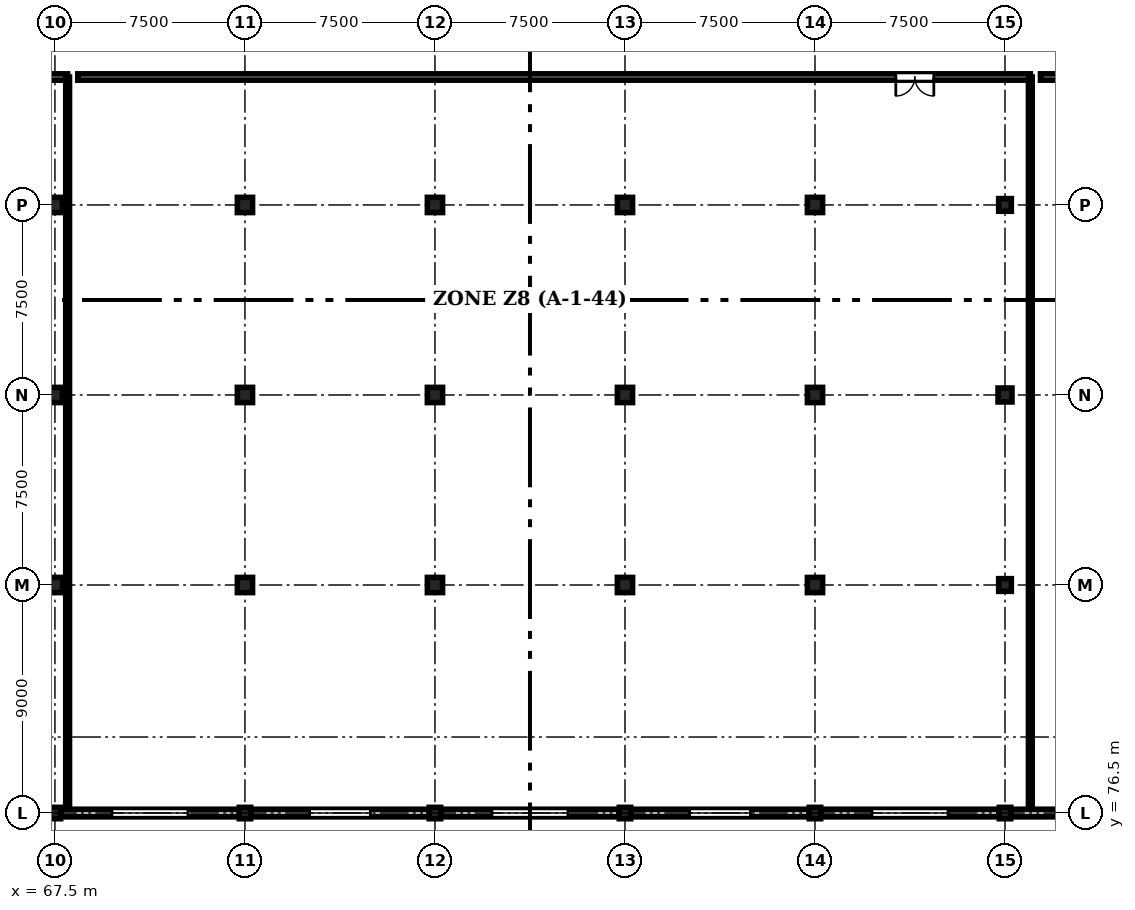
"""IFC4 building model, lengths in metres.
Left out: names, types, materials, properties, quantities, classifications, styles, units other than length and angle.
Written with IfcOpenShell. Run it as: python <this file> out.ifc"""

import sys

from ifc_helpers import new_model, si_unit, direction, frame, frame_2d, origin, origin_2d, place, context, subcontext, project, spatial, rectangle, circle, extrude, element, fill, save


model = new_model("IFC4")
c1 = context("Model", 3, precision=1e-05, world=origin(), true_north=direction((0.0, 1.0)))
c2 = subcontext(c1, "Body", "Model", "MODEL_VIEW")
j1 = project(units=[si_unit("LENGTHUNIT", "METRE"), si_unit("PLANEANGLEUNIT", "RADIAN")], contexts=[c1])
p1 = place(None, origin())
s1 = spatial("IfcSite", under=j1, at=p1, CompositionType="ELEMENT")
p2 = place(p1, origin())
s2 = spatial("IfcBuilding", under=s1, at=p2, CompositionType="ELEMENT")
p3 = place(p2, frame((0.0, 0.0, 14.1)))
s3 = spatial("IfcBuildingStorey", under=s2, at=p3, CompositionType="ELEMENT", Elevation=14.1)
p4 = place(p3, frame((67.5, 76.5, 0.0), z_axis=(0.0, 0.0, 1.0), x_axis=(1.0, 0.0, 0.0)))
e1 = element("IfcColumn", 1, at=p4, inside=s3, PredefinedType="COLUMN", context=c2, shape_type="SweptSolid", body=[
    extrude(rectangle(XDim=0.45, YDim=0.45, at=origin_2d()), origin(), (0.0, 0.0, 1.0), 3.75),
])
p5 = place(p3, frame((67.5, 85.5, 0.0), z_axis=(0.0, 0.0, 1.0), x_axis=(1.0, 0.0, 0.0)))
e2 = element("IfcColumn", 2, at=p5, inside=s3, PredefinedType="COLUMN", context=c2, shape_type="SweptSolid", body=[
    extrude(rectangle(XDim=0.6, YDim=0.6, at=origin_2d()), origin(), (0.0, 0.0, 1.0), 3.75),
])
p6 = place(p3, frame((67.5, 93.0, 0.0), z_axis=(0.0, 0.0, 1.0), x_axis=(1.0, 0.0, 0.0)))
e3 = element("IfcColumn", 3, at=p6, inside=s3, PredefinedType="COLUMN", context=c2, shape_type="SweptSolid", body=[
    extrude(circle(Radius=0.3, at=origin_2d()), origin(), (0.0, 0.0, 1.0), 3.75),
])
p7 = place(p3, frame((67.5, 100.5, 0.0), z_axis=(0.0, 0.0, 1.0), x_axis=(1.0, 0.0, 0.0)))
e4 = element("IfcColumn", 4, at=p7, inside=s3, PredefinedType="COLUMN", context=c2, shape_type="SweptSolid", body=[
    extrude(rectangle(XDim=0.6, YDim=0.6, at=origin_2d()), origin(), (0.0, 0.0, 1.0), 3.75),
])
p8 = place(p3, frame((75.0, 76.5, 0.0), z_axis=(0.0, 0.0, 1.0), x_axis=(1.0, 0.0, 0.0)))
e5 = element("IfcColumn", 5, at=p8, inside=s3, PredefinedType="COLUMN", context=c2, shape_type="SweptSolid", body=[
    extrude(rectangle(XDim=0.45, YDim=0.45, at=origin_2d()), origin(), (0.0, 0.0, 1.0), 3.75),
])
p9 = place(p3, frame((75.0, 85.5, 0.0), z_axis=(0.0, 0.0, 1.0), x_axis=(1.0, 0.0, 0.0)))
e6 = element("IfcColumn", 6, at=p9, inside=s3, PredefinedType="COLUMN", context=c2, shape_type="SweptSolid", body=[
    extrude(circle(Radius=0.3, at=origin_2d()), origin(), (0.0, 0.0, 1.0), 3.75),
])
for number, where, z_axis, x_axis in (
    (7, (75.0, 93.0, 0.0), (0.0, 0.0, 1.0), (1.0, 0.0, 0.0)),
    (8, (75.0, 100.5, 0.0), (0.0, 0.0, 1.0), (1.0, 0.0, 0.0)),
):
    element("IfcColumn", number, at=place(p3, frame(where, z_axis=z_axis, x_axis=x_axis)), inside=s3, PredefinedType="COLUMN", context=c2, shape_type="SweptSolid", body=[
        extrude(rectangle(XDim=0.6, YDim=0.6, at=origin_2d()), origin(), (0.0, 0.0, 1.0), 3.75),
    ])
p10 = place(p3, frame((82.5, 76.5, 0.0), z_axis=(0.0, 0.0, 1.0), x_axis=(1.0, 0.0, 0.0)))
e9 = element("IfcColumn", 9, at=p10, inside=s3, PredefinedType="COLUMN", context=c2, shape_type="SweptSolid", body=[
    extrude(rectangle(XDim=0.45, YDim=0.45, at=origin_2d()), origin(), (0.0, 0.0, 1.0), 3.75),
])
for number, where, z_axis, x_axis in (
    (10, (82.5, 85.5, 0.0), (0.0, 0.0, 1.0), (1.0, 0.0, 0.0)),
    (11, (82.5, 93.0, 0.0), (0.0, 0.0, 1.0), (1.0, 0.0, 0.0)),
):
    element("IfcColumn", number, at=place(p3, frame(where, z_axis=z_axis, x_axis=x_axis)), inside=s3, PredefinedType="COLUMN", context=c2, shape_type="SweptSolid", body=[
        extrude(rectangle(XDim=0.6, YDim=0.6, at=origin_2d()), origin(), (0.0, 0.0, 1.0), 3.75),
    ])
p11 = place(p3, frame((82.5, 100.5, 0.0), z_axis=(0.0, 0.0, 1.0), x_axis=(1.0, 0.0, 0.0)))
e12 = element("IfcColumn", 12, at=p11, inside=s3, PredefinedType="COLUMN", context=c2, shape_type="SweptSolid", body=[
    extrude(circle(Radius=0.3, at=origin_2d()), origin(), (0.0, 0.0, 1.0), 3.75),
])
p12 = place(p3, frame((90.0, 76.5, 0.0), z_axis=(0.0, 0.0, 1.0), x_axis=(1.0, 0.0, 0.0)))
e13 = element("IfcColumn", 13, at=p12, inside=s3, PredefinedType="COLUMN", context=c2, shape_type="SweptSolid", body=[
    extrude(rectangle(XDim=0.45, YDim=0.45, at=origin_2d()), origin(), (0.0, 0.0, 1.0), 3.75),
])
p13 = place(p3, frame((90.0, 85.5, 0.0), z_axis=(0.0, 0.0, 1.0), x_axis=(1.0, 0.0, 0.0)))
e14 = element("IfcColumn", 14, at=p13, inside=s3, PredefinedType="COLUMN", context=c2, shape_type="SweptSolid", body=[
    extrude(rectangle(XDim=0.6, YDim=0.6, at=origin_2d()), origin(), (0.0, 0.0, 1.0), 3.75),
])
p14 = place(p3, frame((90.0, 93.0, 0.0), z_axis=(0.0, 0.0, 1.0), x_axis=(1.0, 0.0, 0.0)))
e15 = element("IfcColumn", 15, at=p14, inside=s3, PredefinedType="COLUMN", context=c2, shape_type="SweptSolid", body=[
    extrude(circle(Radius=0.3, at=origin_2d()), origin(), (0.0, 0.0, 1.0), 3.75),
])
p15 = place(p3, frame((90.0, 100.5, 0.0), z_axis=(0.0, 0.0, 1.0), x_axis=(1.0, 0.0, 0.0)))
e16 = element("IfcColumn", 16, at=p15, inside=s3, PredefinedType="COLUMN", context=c2, shape_type="SweptSolid", body=[
    extrude(rectangle(XDim=0.6, YDim=0.6, at=origin_2d()), origin(), (0.0, 0.0, 1.0), 3.75),
])
p16 = place(p3, frame((97.5, 76.5, 0.0), z_axis=(0.0, 0.0, 1.0), x_axis=(1.0, 0.0, 0.0)))
e17 = element("IfcColumn", 17, at=p16, inside=s3, PredefinedType="COLUMN", context=c2, shape_type="SweptSolid", body=[
    extrude(rectangle(XDim=0.45, YDim=0.45, at=origin_2d()), origin(), (0.0, 0.0, 1.0), 3.75),
])
p17 = place(p3, frame((97.5, 85.5, 0.0), z_axis=(0.0, 0.0, 1.0), x_axis=(1.0, 0.0, 0.0)))
e18 = element("IfcColumn", 18, at=p17, inside=s3, PredefinedType="COLUMN", context=c2, shape_type="SweptSolid", body=[
    extrude(circle(Radius=0.3, at=origin_2d()), origin(), (0.0, 0.0, 1.0), 3.75),
])
for number, where, z_axis, x_axis in (
    (19, (97.5, 93.0, 0.0), (0.0, 0.0, 1.0), (1.0, 0.0, 0.0)),
    (20, (97.5, 100.5, 0.0), (0.0, 0.0, 1.0), (1.0, 0.0, 0.0)),
):
    element("IfcColumn", number, at=place(p3, frame(where, z_axis=z_axis, x_axis=x_axis)), inside=s3, PredefinedType="COLUMN", context=c2, shape_type="SweptSolid", body=[
        extrude(rectangle(XDim=0.6, YDim=0.6, at=origin_2d()), origin(), (0.0, 0.0, 1.0), 3.75),
    ])
p18 = place(p3, frame((105.0, 76.5, 0.0), z_axis=(0.0, 0.0, 1.0), x_axis=(1.0, 0.0, 0.0)))
e21 = element("IfcColumn", 21, at=p18, inside=s3, PredefinedType="COLUMN", context=c2, shape_type="SweptSolid", body=[
    extrude(rectangle(XDim=0.45, YDim=0.45, at=origin_2d()), origin(), (0.0, 0.0, 1.0), 3.75),
])
p19 = place(p3, frame((105.0, 85.5, 0.0), z_axis=(0.0, 0.0, 1.0), x_axis=(1.0, 0.0, 0.0)))
e22 = element("IfcColumn", 22, at=p19, inside=s3, PredefinedType="COLUMN", context=c2, shape_type="SweptSolid", body=[
    extrude(rectangle(XDim=0.5, YDim=0.5, at=origin_2d()), origin(), (0.0, 0.0, 1.0), 3.75),
])
p20 = place(p3, frame((105.0, 93.0, 0.0), z_axis=(0.0, 0.0, 1.0), x_axis=(1.0, 0.0, 0.0)))
e23 = element("IfcColumn", 23, at=p20, inside=s3, PredefinedType="COLUMN", context=c2, shape_type="SweptSolid", body=[
    extrude(rectangle(XDim=0.55, YDim=0.55, at=origin_2d()), origin(), (0.0, 0.0, 1.0), 3.75),
])
p21 = place(p3, frame((105.0, 100.5, 0.0), z_axis=(0.0, 0.0, 1.0), x_axis=(1.0, 0.0, 0.0)))
e24 = element("IfcColumn", 24, at=p21, inside=s3, PredefinedType="COLUMN", context=c2, shape_type="SweptSolid", body=[
    extrude(rectangle(XDim=0.5, YDim=0.5, at=origin_2d()), origin(), (0.0, 0.0, 1.0), 3.75),
])
p22 = place(p3, frame((74.765, 76.5, 0.0), z_axis=(0.0, 0.0, 1.0), x_axis=(-1.0, 0.0, 0.0)))
e25 = element("IfcWall", 25, at=p22, inside=s3, PredefinedType="STANDARD", context=c2, shape_type="SweptSolid", body=[
    extrude(rectangle(XDim=7.03, YDim=0.3, at=frame_2d((3.515, 0.0))), origin(), (0.0, 0.0, 1.0), 2.87),
])
p23 = place(p22, frame((2.015, 0.0, 1.1)))
e26 = element("IfcOpeningElement", 26, at=p23, cuts=e25, PredefinedType="OPENING", context=c2, shape_type="SweptSolid", body=[
    extrude(rectangle(XDim=3.0, YDim=1.2, at=frame_2d((1.5, 0.6))), frame((0.0, 0.16, 0.0), z_axis=(0.0, -1.0, 0.0), x_axis=(1.0, 0.0, 0.0)), (0.0, 0.0, 1.0), 0.32),
])
p24 = place(p3, frame((82.265, 76.5, 0.0), z_axis=(0.0, 0.0, 1.0), x_axis=(-1.0, 0.0, 0.0)))
e27 = element("IfcWall", 27, at=p24, inside=s3, PredefinedType="STANDARD", context=c2, shape_type="SweptSolid", body=[
    extrude(rectangle(XDim=7.03, YDim=0.3, at=frame_2d((3.515, 0.0))), origin(), (0.0, 0.0, 1.0), 2.87),
])
p25 = place(p24, frame((2.315, 0.0, 1.1)))
e28 = element("IfcOpeningElement", 28, at=p25, cuts=e27, PredefinedType="OPENING", context=c2, shape_type="SweptSolid", body=[
    extrude(rectangle(XDim=2.4, YDim=1.2, at=frame_2d((1.2, 0.6))), frame((0.0, 0.16, 0.0), z_axis=(0.0, -1.0, 0.0), x_axis=(1.0, 0.0, 0.0)), (0.0, 0.0, 1.0), 0.32),
])
p26 = place(p3, frame((89.765, 76.5, 0.0), z_axis=(0.0, 0.0, 1.0), x_axis=(-1.0, 0.0, 0.0)))
e29 = element("IfcWall", 29, at=p26, inside=s3, PredefinedType="STANDARD", context=c2, shape_type="SweptSolid", body=[
    extrude(rectangle(XDim=7.03, YDim=0.3, at=frame_2d((3.515, 0.0))), origin(), (0.0, 0.0, 1.0), 2.87),
])
p27 = place(p26, frame((2.015, 0.0, 1.1)))
e30 = element("IfcOpeningElement", 30, at=p27, cuts=e29, PredefinedType="OPENING", context=c2, shape_type="SweptSolid", body=[
    extrude(rectangle(XDim=3.0, YDim=1.2, at=frame_2d((1.5, 0.6))), frame((0.0, 0.16, 0.0), z_axis=(0.0, -1.0, 0.0), x_axis=(1.0, 0.0, 0.0)), (0.0, 0.0, 1.0), 0.32),
])
p28 = place(p3, frame((97.265, 76.5, 0.0), z_axis=(0.0, 0.0, 1.0), x_axis=(-1.0, 0.0, 0.0)))
e31 = element("IfcWall", 31, at=p28, inside=s3, PredefinedType="STANDARD", context=c2, shape_type="SweptSolid", body=[
    extrude(rectangle(XDim=7.03, YDim=0.3, at=frame_2d((3.515, 0.0))), origin(), (0.0, 0.0, 1.0), 2.87),
])
p29 = place(p28, frame((2.315, 0.0, 1.1)))
e32 = element("IfcOpeningElement", 32, at=p29, cuts=e31, PredefinedType="OPENING", context=c2, shape_type="SweptSolid", body=[
    extrude(rectangle(XDim=2.4, YDim=1.2, at=frame_2d((1.2, 0.6))), frame((0.0, 0.16, 0.0), z_axis=(0.0, -1.0, 0.0), x_axis=(1.0, 0.0, 0.0)), (0.0, 0.0, 1.0), 0.32),
])
p30 = place(p3, frame((104.765, 76.5, 0.0), z_axis=(0.0, 0.0, 1.0), x_axis=(-1.0, 0.0, 0.0)))
e33 = element("IfcWall", 33, at=p30, inside=s3, PredefinedType="STANDARD", context=c2, shape_type="SweptSolid", body=[
    extrude(rectangle(XDim=7.03, YDim=0.3, at=frame_2d((3.515, 0.0))), origin(), (0.0, 0.0, 1.0), 2.87),
])
p31 = place(p30, frame((2.015, 0.0, 1.1)))
e34 = element("IfcOpeningElement", 34, at=p31, cuts=e33, PredefinedType="OPENING", context=c2, shape_type="SweptSolid", body=[
    extrude(rectangle(XDim=3.0, YDim=1.2, at=frame_2d((1.5, 0.6))), frame((0.0, 0.16, 0.0), z_axis=(0.0, -1.0, 0.0), x_axis=(1.0, 0.0, 0.0)), (0.0, 0.0, 1.0), 0.32),
])
p32 = place(p3, frame((112.265, 76.5, 0.0), z_axis=(0.0, 0.0, 1.0), x_axis=(-1.0, 0.0, 0.0)))
e35 = element("IfcWall", 35, at=p32, inside=s3, PredefinedType="STANDARD", context=c2, shape_type="SweptSolid", body=[
    extrude(rectangle(XDim=7.03, YDim=0.3, at=frame_2d((3.515, 0.0))), origin(), (0.0, 0.0, 1.0), 2.87),
])
p33 = place(p32, frame((2.315, 0.0, 1.1)))
e36 = element("IfcOpeningElement", 36, at=p33, cuts=e35, PredefinedType="OPENING", context=c2, shape_type="SweptSolid", body=[
    extrude(rectangle(XDim=2.4, YDim=1.2, at=frame_2d((1.2, 0.6))), frame((0.0, 0.16, 0.0), z_axis=(0.0, -1.0, 0.0), x_axis=(1.0, 0.0, 0.0)), (0.0, 0.0, 1.0), 0.32),
])
p34 = place(p3, frame((68.0, 105.55, 0.0), z_axis=(0.0, 0.0, 1.0), x_axis=(-1.0, 0.0, 0.0)))
e37 = element("IfcWall", 37, at=p34, inside=s3, PredefinedType="STANDARD", context=c2, shape_type="SweptSolid", body=[
    extrude(rectangle(XDim=37.65, YDim=0.25, at=frame_2d((18.825, 0.0))), origin(), (0.0, 0.0, 1.0), 3.455),
])
p35 = place(p34, frame((10.945, 0.0, 0.0)))
e38 = element("IfcOpeningElement", 38, at=p35, cuts=e37, PredefinedType="OPENING", context=c2, shape_type="SweptSolid", body=[
    extrude(rectangle(XDim=1.5, YDim=2.3, at=frame_2d((0.75, 1.15))), frame((0.0, 0.135, 0.0), z_axis=(0.0, -1.0, 0.0), x_axis=(1.0, 0.0, 0.0)), (0.0, 0.0, 1.0), 0.27),
])
p36 = place(p3, frame((106.0, 105.55, 0.0), z_axis=(0.0, 0.0, 1.0), x_axis=(-1.0, 0.0, 0.0)))
e39 = element("IfcWall", 39, at=p36, inside=s3, PredefinedType="STANDARD", context=c2, shape_type="SweptSolid", body=[
    extrude(rectangle(XDim=37.6, YDim=0.25, at=frame_2d((18.8, 0.0))), origin(), (0.0, 0.0, 1.0), 3.455),
])
p37 = place(p36, frame((3.81, 0.0, 0.0)))
e40 = element("IfcOpeningElement", 40, at=p37, cuts=e39, PredefinedType="OPENING", context=c2, shape_type="SweptSolid", body=[
    extrude(rectangle(XDim=1.5, YDim=2.3, at=frame_2d((0.75, 1.15))), frame((0.0, 0.135, 0.0), z_axis=(0.0, -1.0, 0.0), x_axis=(1.0, 0.0, 0.0)), (0.0, 0.0, 1.0), 0.27),
])
p38 = place(p3, frame((142.15, 105.55, 0.0), z_axis=(0.0, 0.0, 1.0), x_axis=(-1.0, 0.0, 0.0)))
e41 = element("IfcWall", 41, at=p38, inside=s3, PredefinedType="STANDARD", context=c2, shape_type="SweptSolid", body=[
    extrude(rectangle(XDim=35.75, YDim=0.25, at=frame_2d((17.875, 0.0))), origin(), (0.0, 0.0, 1.0), 3.455),
])
p39 = place(p38, frame((10.375, 0.0, 0.0)))
e42 = element("IfcOpeningElement", 42, at=p39, cuts=e41, PredefinedType="OPENING", context=c2, shape_type="SweptSolid", body=[
    extrude(rectangle(XDim=1.5, YDim=2.3, at=frame_2d((0.75, 1.15))), frame((0.0, 0.135, 0.0), z_axis=(0.0, -1.0, 0.0), x_axis=(1.0, 0.0, 0.0)), (0.0, 0.0, 1.0), 0.27),
])
for number, where, z_axis, x_axis in (
    (43, (68.0, 76.85, 0.0), (0.0, 0.0, 1.0), (0.0, 1.0, 0.0)),
    (44, (106.0, 76.85, 0.0), (0.0, 0.0, 1.0), (0.0, 1.0, 0.0)),
):
    element("IfcWall", number, at=place(p3, frame(where, z_axis=z_axis, x_axis=x_axis)), inside=s3, PredefinedType="PARTITIONING", context=c2, shape_type="SweptSolid", body=[
        extrude(rectangle(XDim=28.7, YDim=0.15, at=frame_2d((14.35, 0.0))), origin(), (0.0, 0.0, 1.0), 3.455),
    ])
p40 = place(p23, origin())
e45 = element("IfcWindow", 45, at=p40, inside=s3, PartitioningType="SINGLE_PANEL", PredefinedType="WINDOW", context=c2, shape_type="SweptSolid", body=[
    extrude(rectangle(XDim=3.0, YDim=1.2, at=frame_2d((1.5, 0.6))), frame((0.0, 0.03, 0.0), z_axis=(0.0, -1.0, 0.0), x_axis=(1.0, 0.0, 0.0)), (0.0, 0.0, 1.0), 0.06),
])
fill(e26, e45)
p41 = place(p25, origin())
e46 = element("IfcWindow", 46, at=p41, inside=s3, PartitioningType="SINGLE_PANEL", PredefinedType="WINDOW", context=c2, shape_type="SweptSolid", body=[
    extrude(rectangle(XDim=2.4, YDim=1.2, at=frame_2d((1.2, 0.6))), frame((0.0, 0.03, 0.0), z_axis=(0.0, -1.0, 0.0), x_axis=(1.0, 0.0, 0.0)), (0.0, 0.0, 1.0), 0.06),
])
fill(e28, e46)
p42 = place(p27, origin())
e47 = element("IfcWindow", 47, at=p42, inside=s3, PartitioningType="SINGLE_PANEL", PredefinedType="WINDOW", context=c2, shape_type="SweptSolid", body=[
    extrude(rectangle(XDim=3.0, YDim=1.2, at=frame_2d((1.5, 0.6))), frame((0.0, 0.03, 0.0), z_axis=(0.0, -1.0, 0.0), x_axis=(1.0, 0.0, 0.0)), (0.0, 0.0, 1.0), 0.06),
])
fill(e30, e47)
p43 = place(p29, origin())
e48 = element("IfcWindow", 48, at=p43, inside=s3, PartitioningType="SINGLE_PANEL", PredefinedType="WINDOW", context=c2, shape_type="SweptSolid", body=[
    extrude(rectangle(XDim=2.4, YDim=1.2, at=frame_2d((1.2, 0.6))), frame((0.0, 0.03, 0.0), z_axis=(0.0, -1.0, 0.0), x_axis=(1.0, 0.0, 0.0)), (0.0, 0.0, 1.0), 0.06),
])
fill(e32, e48)
p44 = place(p31, origin())
e49 = element("IfcWindow", 49, at=p44, inside=s3, PartitioningType="SINGLE_PANEL", PredefinedType="WINDOW", context=c2, shape_type="SweptSolid", body=[
    extrude(rectangle(XDim=3.0, YDim=1.2, at=frame_2d((1.5, 0.6))), frame((0.0, 0.03, 0.0), z_axis=(0.0, -1.0, 0.0), x_axis=(1.0, 0.0, 0.0)), (0.0, 0.0, 1.0), 0.06),
])
fill(e34, e49)
p45 = place(p37, origin())
e50 = element("IfcDoor", 50, at=p45, inside=s3, OperationType="DOUBLE_DOOR_SINGLE_SWING", PredefinedType="DOOR", context=c2, shape_type="SweptSolid", body=[
    extrude(rectangle(XDim=1.5, YDim=2.3, at=frame_2d((0.75, 1.15))), frame((0.0, 0.025, 0.0), z_axis=(0.0, -1.0, 0.0), x_axis=(1.0, 0.0, 0.0)), (0.0, 0.0, 1.0), 0.05),
])
fill(e40, e50)
save(model, sys.argv[1])
